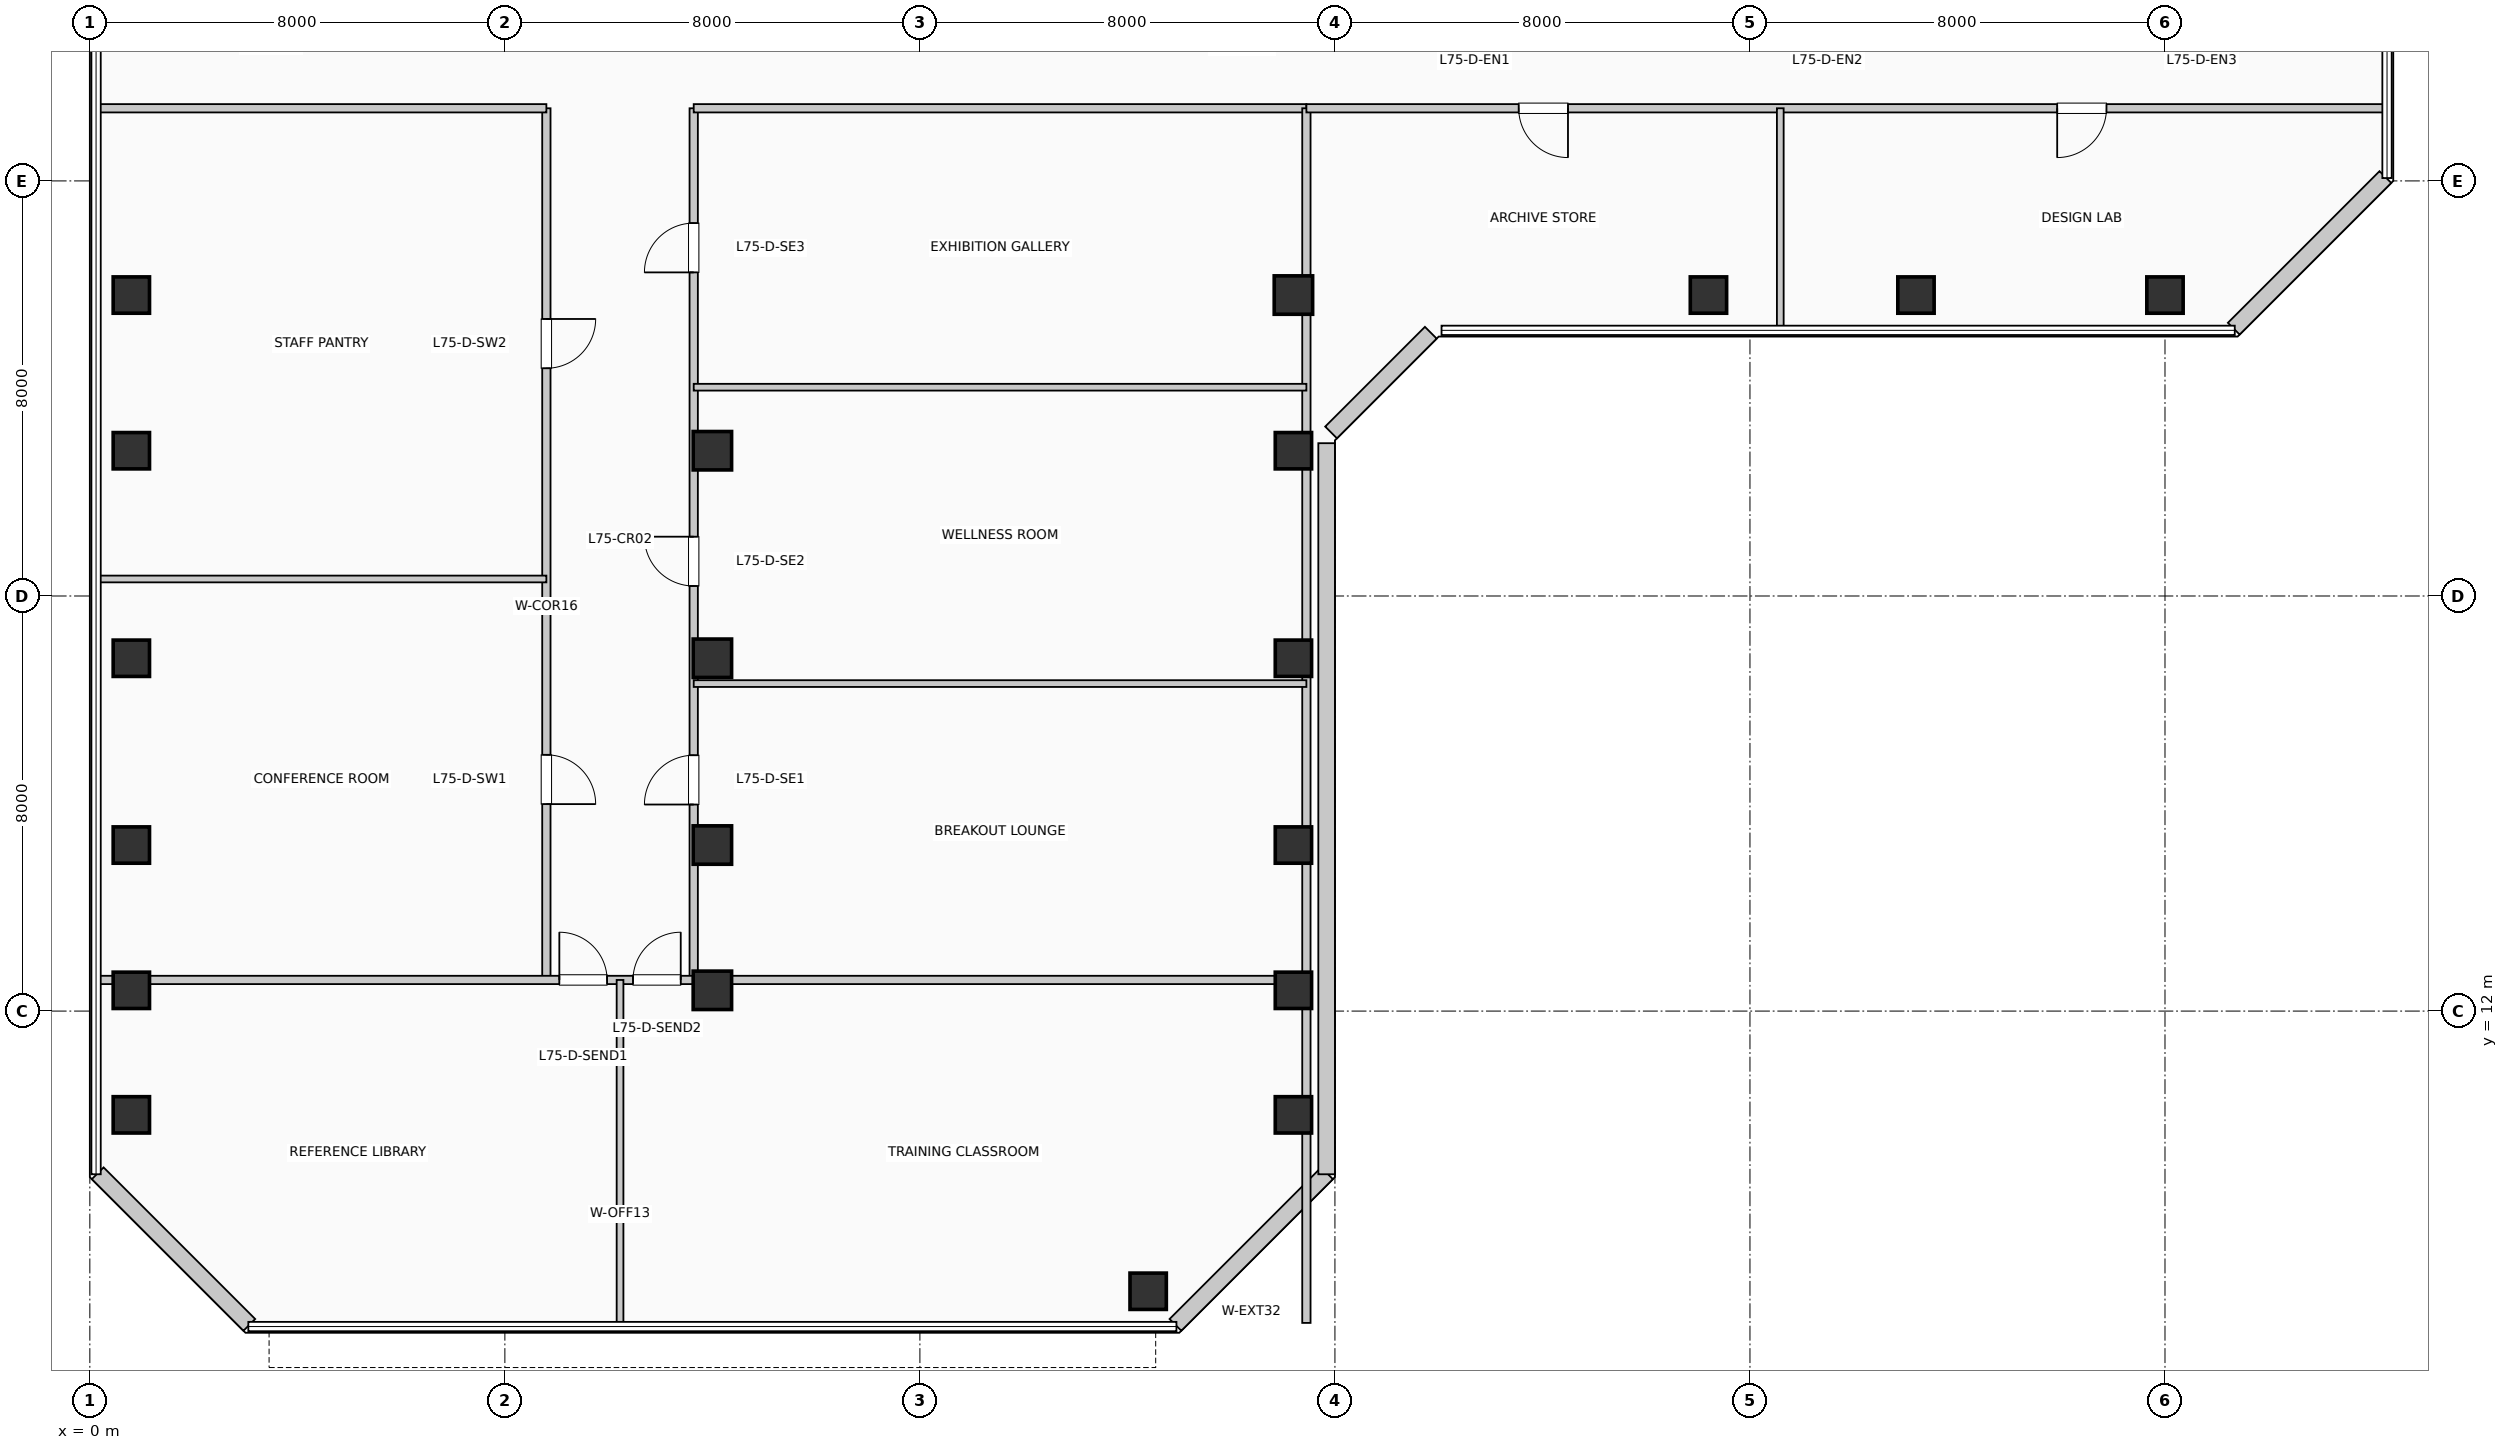
"""IFC4 building model, lengths in metres.
Left out: names, types, materials, properties, quantities, classifications, styles, units other than length and angle.
Written with IfcOpenShell. Run it as: python <this file> out.ifc"""

import sys

from ifc_helpers import new_model, si_unit, direction, frame, frame_2d, origin, origin_2d, place, context, subcontext, project, spatial, rectangle, extrude, element, fill, save


model = new_model("IFC4")
c1 = context("Model", 3, precision=1e-05, world=origin(), true_north=direction((0.0, 1.0)))
c2 = subcontext(c1, "Body", "Model", "MODEL_VIEW")
j1 = project(units=[si_unit("LENGTHUNIT", "METRE"), si_unit("PLANEANGLEUNIT", "RADIAN")], contexts=[c1])
p1 = place(None, origin())
s1 = spatial("IfcSite", under=j1, at=p1, CompositionType="ELEMENT")
p2 = place(p1, origin())
s2 = spatial("IfcBuilding", under=s1, at=p2, CompositionType="ELEMENT")
p3 = place(p2, frame((0.0, 0.0, 307.89)))
s3 = spatial("IfcBuildingStorey", under=s2, at=p3, CompositionType="ELEMENT", Elevation=307.89)
for number, where, z_axis, x_axis in (
    (1, (0.8, 10.0, 0.0), (0.0, 0.0, 1.0), (1.0, 0.0, 0.0)),
    (2, (0.8, 12.4, 0.0), (0.0, 0.0, 1.0), (1.0, 0.0, 0.0)),
    (3, (0.8, 15.2, 0.0), (0.0, 0.0, 1.0), (1.0, 0.0, 0.0)),
    (4, (0.8, 18.8, 0.0), (0.0, 0.0, 1.0), (1.0, 0.0, 0.0)),
    (5, (0.8, 22.8, 0.0), (0.0, 0.0, 1.0), (1.0, 0.0, 0.0)),
    (6, (0.8, 25.8, 0.0), (0.0, 0.0, 1.0), (1.0, 0.0, 0.0)),
):
    element("IfcColumn", number, at=place(p3, frame(where, z_axis=z_axis, x_axis=x_axis)), inside=s3, PredefinedType="COLUMN", context=c2, shape_type="SweptSolid", body=[
        extrude(rectangle(XDim=0.7, YDim=0.7, at=origin_2d()), origin(), (0.0, 0.0, 1.0), 3.96),
    ])
for number, where, z_axis, x_axis in (
    (7, (12.0, 12.4, 0.0), (0.0, 0.0, 1.0), (1.0, 0.0, 0.0)),
    (8, (12.0, 15.2, 0.0), (0.0, 0.0, 1.0), (1.0, 0.0, 0.0)),
    (9, (12.0, 18.8, 0.0), (0.0, 0.0, 1.0), (1.0, 0.0, 0.0)),
    (10, (12.0, 22.8, 0.0), (0.0, 0.0, 1.0), (1.0, 0.0, 0.0)),
):
    element("IfcColumn", number, at=place(p3, frame(where, z_axis=z_axis, x_axis=x_axis)), inside=s3, PredefinedType="COLUMN", context=c2, shape_type="SweptSolid", body=[
        extrude(rectangle(XDim=0.74, YDim=0.74, at=origin_2d()), origin(), (0.0, 0.0, 1.0), 3.96),
    ])
for number, where, z_axis, x_axis in (
    (11, (20.4, 6.6, 0.0), (0.0, 0.0, 1.0), (1.0, 0.0, 0.0)),
    (12, (23.2, 10.0, 0.0), (0.0, 0.0, 1.0), (1.0, 0.0, 0.0)),
    (13, (23.2, 12.4, 0.0), (0.0, 0.0, 1.0), (1.0, 0.0, 0.0)),
    (14, (23.2, 15.2, 0.0), (0.0, 0.0, 1.0), (1.0, 0.0, 0.0)),
    (15, (23.2, 18.8, 0.0), (0.0, 0.0, 1.0), (1.0, 0.0, 0.0)),
    (16, (23.2, 22.8, 0.0), (0.0, 0.0, 1.0), (1.0, 0.0, 0.0)),
):
    element("IfcColumn", number, at=place(p3, frame(where, z_axis=z_axis, x_axis=x_axis)), inside=s3, PredefinedType="COLUMN", context=c2, shape_type="SweptSolid", body=[
        extrude(rectangle(XDim=0.7, YDim=0.7, at=origin_2d()), origin(), (0.0, 0.0, 1.0), 3.96),
    ])
p4 = place(p3, frame((23.2, 25.8, 0.0), z_axis=(0.0, 0.0, 1.0), x_axis=(1.0, 0.0, 0.0)))
e17 = element("IfcColumn", 17, at=p4, inside=s3, PredefinedType="COLUMN", context=c2, shape_type="SweptSolid", body=[
    extrude(rectangle(XDim=0.74, YDim=0.74, at=origin_2d()), origin(), (0.0, 0.0, 1.0), 3.96),
])
for number, where, z_axis, x_axis in (
    (18, (31.2, 25.8, 0.0), (0.0, 0.0, 1.0), (1.0, 0.0, 0.0)),
    (19, (35.2, 25.8, 0.0), (0.0, 0.0, 1.0), (1.0, 0.0, 0.0)),
    (20, (40.0, 25.8, 0.0), (0.0, 0.0, 1.0), (1.0, 0.0, 0.0)),
):
    element("IfcColumn", number, at=place(p3, frame(where, z_axis=z_axis, x_axis=x_axis)), inside=s3, PredefinedType="COLUMN", context=c2, shape_type="SweptSolid", body=[
        extrude(rectangle(XDim=0.7, YDim=0.7, at=origin_2d()), origin(), (0.0, 0.0, 1.0), 3.96),
    ])
p5 = place(p3, frame((20.926, 5.952, 0.0), z_axis=(0.0, 0.0, 1.0), x_axis=(0.707077242712, 0.707136318428, 0.0)))
e21 = element("IfcWall", 21, at=p5, inside=s3, PredefinedType="SOLIDWALL", context=c2, shape_type="SweptSolid", body=[
    extrude(rectangle(XDim=4.133, YDim=0.32, at=frame_2d((2.066, 0.0))), origin(), (0.0, 0.0, 1.0), 3.74),
])
p6 = place(p3, frame((23.84, 8.855, 0.0), z_axis=(0.0, 0.0, 1.0), x_axis=(0.0, 1.0, 0.0)))
e22 = element("IfcWall", 22, at=p6, inside=s3, PredefinedType="SOLIDWALL", context=c2, shape_type="SweptSolid", body=[
    extrude(rectangle(XDim=14.09, YDim=0.32, at=frame_2d((7.045, 0.0))), origin(), (0.0, 0.0, 1.0), 3.74),
])
p7 = place(p3, frame((23.926, 23.152, 0.0), z_axis=(0.0, 0.0, 1.0), x_axis=(0.707106781187, 0.707106781187, 0.0)))
e23 = element("IfcWall", 23, at=p7, inside=s3, PredefinedType="SOLIDWALL", context=c2, shape_type="SweptSolid", body=[
    extrude(rectangle(XDim=2.718, YDim=0.32, at=frame_2d((1.359, 0.0))), origin(), (0.0, 0.0, 1.0), 3.74),
])
for number, where, z_axis, x_axis in (
    (24, (41.326, 25.152, 0.0), (0.0, 0.0, 1.0), (0.707, 0.707, 0.0)),
    (25, (0.152, 8.874, 0.0), (0.0, 0.0, 1.0), (0.707, -0.707, 0.0)),
):
    element("IfcWall", number, at=place(p3, frame(where, z_axis=z_axis, x_axis=x_axis)), inside=s3, PredefinedType="SOLIDWALL", context=c2, shape_type="SweptSolid", body=[
        extrude(rectangle(XDim=4.133, YDim=0.32, at=frame_2d((2.066, 0.0))), origin(), (0.0, 0.0, 1.0), 3.74),
    ])
p8 = place(p3, frame((8.8, 12.6, 0.0), z_axis=(0.0, 0.0, 1.0), x_axis=(0.0, 1.0, 0.0)))
e26 = element("IfcWall", 26, at=p8, inside=s3, PredefinedType="PARTITIONING", context=c2, shape_type="SweptSolid", body=[
    extrude(rectangle(XDim=16.8, YDim=0.16, at=frame_2d((8.4, 0.0))), origin(), (0.0, 0.0, 1.0), 3.74),
])
p9 = place(p8, frame((4.339, 0.0, 0.0), z_axis=(0.0, 0.0, 1.0), x_axis=(-1.0, 0.0, 0.0)))
e27 = element("IfcOpeningElement", 27, at=p9, cuts=e26, PredefinedType="OPENING", context=c2, shape_type="SweptSolid", body=[
    extrude(rectangle(XDim=0.95, YDim=2.15, at=frame_2d((0.475, 1.075))), frame((0.0, 0.09, 0.0), z_axis=(0.0, -1.0, 0.0), x_axis=(1.0, 0.0, 0.0)), (0.0, 0.0, 1.0), 0.18),
])
p10 = place(p8, frame((12.739, 0.0, 0.0), z_axis=(0.0, 0.0, 1.0), x_axis=(-1.0, 0.0, 0.0)))
e28 = element("IfcOpeningElement", 28, at=p10, cuts=e26, PredefinedType="OPENING", context=c2, shape_type="SweptSolid", body=[
    extrude(rectangle(XDim=0.95, YDim=2.15, at=frame_2d((0.475, 1.075))), frame((0.0, 0.09, 0.0), z_axis=(0.0, -1.0, 0.0), x_axis=(1.0, 0.0, 0.0)), (0.0, 0.0, 1.0), 0.18),
])
p11 = place(p3, frame((11.64, 12.6, 0.0), z_axis=(0.0, 0.0, 1.0), x_axis=(0.0, 1.0, 0.0)))
e29 = element("IfcWall", 29, at=p11, inside=s3, PredefinedType="PARTITIONING", context=c2, shape_type="SweptSolid", body=[
    extrude(rectangle(XDim=16.8, YDim=0.16, at=frame_2d((8.4, 0.0))), origin(), (0.0, 0.0, 1.0), 3.175),
])
p12 = place(p11, frame((3.381, 0.0, 0.0)))
e30 = element("IfcOpeningElement", 30, at=p12, cuts=e29, PredefinedType="OPENING", context=c2, shape_type="SweptSolid", body=[
    extrude(rectangle(XDim=0.95, YDim=2.15, at=frame_2d((0.475, 1.075))), frame((0.0, 0.09, 0.0), z_axis=(0.0, -1.0, 0.0), x_axis=(1.0, 0.0, 0.0)), (0.0, 0.0, 1.0), 0.18),
])
p13 = place(p11, frame((7.593, 0.0, 0.0)))
e31 = element("IfcOpeningElement", 31, at=p13, cuts=e29, PredefinedType="OPENING", context=c2, shape_type="SweptSolid", body=[
    extrude(rectangle(XDim=0.95, YDim=2.15, at=frame_2d((0.475, 1.075))), frame((0.0, 0.09, 0.0), z_axis=(0.0, -1.0, 0.0), x_axis=(1.0, 0.0, 0.0)), (0.0, 0.0, 1.0), 0.18),
])
p14 = place(p11, frame((13.637, 0.0, 0.0)))
e32 = element("IfcOpeningElement", 32, at=p14, cuts=e29, PredefinedType="OPENING", context=c2, shape_type="SweptSolid", body=[
    extrude(rectangle(XDim=0.95, YDim=2.15, at=frame_2d((0.475, 1.075))), frame((0.0, 0.09, 0.0), z_axis=(0.0, -1.0, 0.0), x_axis=(1.0, 0.0, 0.0)), (0.0, 0.0, 1.0), 0.18),
])
p15 = place(p3, frame((0.19, 12.6, 0.0), z_axis=(0.0, 0.0, 1.0), x_axis=(1.0, 0.0, 0.0)))
e33 = element("IfcWall", 33, at=p15, inside=s3, PredefinedType="PARTITIONING", context=c2, shape_type="SweptSolid", body=[
    extrude(rectangle(XDim=23.26, YDim=0.16, at=frame_2d((11.63, 0.0))), origin(), (0.0, 0.0, 1.0), 3.175),
])
p16 = place(p15, frame((8.86, 0.0, 0.0)))
e34 = element("IfcOpeningElement", 34, at=p16, cuts=e33, PredefinedType="OPENING", context=c2, shape_type="SweptSolid", body=[
    extrude(rectangle(XDim=0.92, YDim=2.1, at=frame_2d((0.46, 1.05))), frame((0.0, 0.09, 0.0), z_axis=(0.0, -1.0, 0.0), x_axis=(1.0, 0.0, 0.0)), (0.0, 0.0, 1.0), 0.18),
])
p17 = place(p15, frame((10.28, 0.0, 0.0)))
e35 = element("IfcOpeningElement", 35, at=p17, cuts=e33, PredefinedType="OPENING", context=c2, shape_type="SweptSolid", body=[
    extrude(rectangle(XDim=0.92, YDim=2.1, at=frame_2d((0.46, 1.05))), frame((0.0, 0.09, 0.0), z_axis=(0.0, -1.0, 0.0), x_axis=(1.0, 0.0, 0.0)), (0.0, 0.0, 1.0), 0.18),
])
p18 = place(p3, frame((0.19, 29.4, 0.0), z_axis=(0.0, 0.0, 1.0), x_axis=(1.0, 0.0, 0.0)))
e36 = element("IfcWall", 36, at=p18, inside=s3, PredefinedType="PARTITIONING", context=c2, shape_type="SweptSolid", body=[
    extrude(rectangle(XDim=8.61, YDim=0.16, at=frame_2d((4.305, 0.0))), origin(), (0.0, 0.0, 1.0), 3.425),
])
p19 = place(p3, frame((11.64, 29.4, 0.0), z_axis=(0.0, 0.0, 1.0), x_axis=(1.0, 0.0, 0.0)))
e37 = element("IfcWall", 37, at=p19, inside=s3, PredefinedType="PARTITIONING", context=c2, shape_type="SweptSolid", body=[
    extrude(rectangle(XDim=11.81, YDim=0.16, at=frame_2d((5.905, 0.0))), origin(), (0.0, 0.0, 1.0), 3.425),
])
p20 = place(p3, frame((23.45, 5.99, 0.0), z_axis=(0.0, 0.0, 1.0), x_axis=(0.0, 1.0, 0.0)))
e38 = element("IfcWall", 38, at=p20, inside=s3, PredefinedType="PARTITIONING", context=c2, shape_type="SweptSolid", body=[
    extrude(rectangle(XDim=23.41, YDim=0.16, at=frame_2d((11.705, 0.0))), origin(), (0.0, 0.0, 1.0), 3.175),
])
p21 = place(p3, frame((10.22, 5.99, 0.0), z_axis=(0.0, 0.0, 1.0), x_axis=(0.0, 1.0, 0.0)))
e39 = element("IfcWall", 39, at=p21, inside=s3, PredefinedType="PARTITIONING", context=c2, shape_type="SweptSolid", body=[
    extrude(rectangle(XDim=6.61, YDim=0.13, at=frame_2d((3.305, 0.0))), origin(), (0.0, 0.0, 1.0), 3.74),
])
p22 = place(p3, frame((0.19, 20.328, 0.0), z_axis=(0.0, 0.0, 1.0), x_axis=(1.0, 0.0, 0.0)))
e40 = element("IfcWall", 40, at=p22, inside=s3, PredefinedType="PARTITIONING", context=c2, shape_type="SweptSolid", body=[
    extrude(rectangle(XDim=8.61, YDim=0.13, at=frame_2d((4.305, 0.0))), origin(), (0.0, 0.0, 1.0), 3.74),
])
for number, where, z_axis, x_axis in (
    (41, (11.64, 18.312, 0.0), (0.0, 0.0, 1.0), (1.0, 0.0, 0.0)),
    (42, (11.64, 24.024, 0.0), (0.0, 0.0, 1.0), (1.0, 0.0, 0.0)),
):
    element("IfcWall", number, at=place(p3, frame(where, z_axis=z_axis, x_axis=x_axis)), inside=s3, PredefinedType="PARTITIONING", context=c2, shape_type="SweptSolid", body=[
        extrude(rectangle(XDim=11.81, YDim=0.13, at=frame_2d((5.905, 0.0))), origin(), (0.0, 0.0, 1.0), 3.74),
    ])
p23 = place(p3, frame((23.45, 29.4, 0.0), z_axis=(0.0, 0.0, 1.0), x_axis=(1.0, 0.0, 0.0)))
e43 = element("IfcWall", 43, at=p23, inside=s3, PredefinedType="PARTITIONING", context=c2, shape_type="SweptSolid", body=[
    extrude(rectangle(XDim=20.76, YDim=0.16, at=frame_2d((10.38, 0.0))), origin(), (0.0, 0.0, 1.0), 3.425),
])
p24 = place(p23, frame((5.042, 0.0, 0.0), z_axis=(0.0, 0.0, 1.0), x_axis=(-1.0, 0.0, 0.0)))
e44 = element("IfcOpeningElement", 44, at=p24, cuts=e43, PredefinedType="OPENING", context=c2, shape_type="SweptSolid", body=[
    extrude(rectangle(XDim=0.95, YDim=2.15, at=frame_2d((0.475, 1.075))), frame((0.0, 0.09, 0.0), z_axis=(0.0, -1.0, 0.0), x_axis=(1.0, 0.0, 0.0)), (0.0, 0.0, 1.0), 0.18),
])
p25 = place(p23, frame((15.422, 0.0, 0.0), z_axis=(0.0, 0.0, 1.0), x_axis=(-1.0, 0.0, 0.0)))
e45 = element("IfcOpeningElement", 45, at=p25, cuts=e43, PredefinedType="OPENING", context=c2, shape_type="SweptSolid", body=[
    extrude(rectangle(XDim=0.95, YDim=2.15, at=frame_2d((0.475, 1.075))), frame((0.0, 0.09, 0.0), z_axis=(0.0, -1.0, 0.0), x_axis=(1.0, 0.0, 0.0)), (0.0, 0.0, 1.0), 0.18),
])
p26 = place(p3, frame((32.584, 25.19, 0.0), z_axis=(0.0, 0.0, 1.0), x_axis=(0.0, 1.0, 0.0)))
e46 = element("IfcWall", 46, at=p26, inside=s3, PredefinedType="PARTITIONING", context=c2, shape_type="SweptSolid", body=[
    extrude(rectangle(XDim=4.21, YDim=0.13, at=frame_2d((2.105, 0.0))), origin(), (0.0, 0.0, 1.0), 3.74),
])
p27 = place(p16, origin())
e47 = element("IfcDoor", 47, at=p27, inside=s3, OperationType="SINGLE_SWING_LEFT", PredefinedType="DOOR", context=c2, shape_type="SweptSolid", body=[
    extrude(rectangle(XDim=0.92, YDim=2.1, at=frame_2d((0.46, 1.05))), frame((0.0, 0.025, 0.0), z_axis=(0.0, -1.0, 0.0), x_axis=(1.0, 0.0, 0.0)), (0.0, 0.0, 1.0), 0.05),
])
fill(e34, e47)
p28 = place(p17, origin())
e48 = element("IfcDoor", 48, at=p28, inside=s3, OperationType="SINGLE_SWING_RIGHT", PredefinedType="DOOR", context=c2, shape_type="SweptSolid", body=[
    extrude(rectangle(XDim=0.92, YDim=2.1, at=frame_2d((0.46, 1.05))), frame((0.0, 0.025, 0.0), z_axis=(0.0, -1.0, 0.0), x_axis=(1.0, 0.0, 0.0)), (0.0, 0.0, 1.0), 0.05),
])
fill(e35, e48)
p29 = place(p9, origin())
e49 = element("IfcDoor", 49, at=p29, inside=s3, OperationType="SINGLE_SWING_LEFT", PredefinedType="DOOR", context=c2, shape_type="SweptSolid", body=[
    extrude(rectangle(XDim=0.95, YDim=2.15, at=frame_2d((0.475, 1.075))), frame((0.0, 0.025, 0.0), z_axis=(0.0, -1.0, 0.0), x_axis=(1.0, 0.0, 0.0)), (0.0, 0.0, 1.0), 0.05),
])
fill(e27, e49)
p30 = place(p10, origin())
e50 = element("IfcDoor", 50, at=p30, inside=s3, OperationType="SINGLE_SWING_RIGHT", PredefinedType="DOOR", context=c2, shape_type="SweptSolid", body=[
    extrude(rectangle(XDim=0.95, YDim=2.15, at=frame_2d((0.475, 1.075))), frame((0.0, 0.025, 0.0), z_axis=(0.0, -1.0, 0.0), x_axis=(1.0, 0.0, 0.0)), (0.0, 0.0, 1.0), 0.05),
])
fill(e28, e50)
p31 = place(p12, origin())
e51 = element("IfcDoor", 51, at=p31, inside=s3, OperationType="SINGLE_SWING_LEFT", PredefinedType="DOOR", context=c2, shape_type="SweptSolid", body=[
    extrude(rectangle(XDim=0.95, YDim=2.15, at=frame_2d((0.475, 1.075))), frame((0.0, 0.025, 0.0), z_axis=(0.0, -1.0, 0.0), x_axis=(1.0, 0.0, 0.0)), (0.0, 0.0, 1.0), 0.05),
])
fill(e30, e51)
p32 = place(p13, origin())
e52 = element("IfcDoor", 52, at=p32, inside=s3, OperationType="SINGLE_SWING_RIGHT", PredefinedType="DOOR", context=c2, shape_type="SweptSolid", body=[
    extrude(rectangle(XDim=0.95, YDim=2.15, at=frame_2d((0.475, 1.075))), frame((0.0, 0.025, 0.0), z_axis=(0.0, -1.0, 0.0), x_axis=(1.0, 0.0, 0.0)), (0.0, 0.0, 1.0), 0.05),
])
fill(e31, e52)
p33 = place(p14, origin())
e53 = element("IfcDoor", 53, at=p33, inside=s3, OperationType="SINGLE_SWING_LEFT", PredefinedType="DOOR", context=c2, shape_type="SweptSolid", body=[
    extrude(rectangle(XDim=0.95, YDim=2.15, at=frame_2d((0.475, 1.075))), frame((0.0, 0.025, 0.0), z_axis=(0.0, -1.0, 0.0), x_axis=(1.0, 0.0, 0.0)), (0.0, 0.0, 1.0), 0.05),
])
fill(e32, e53)
p34 = place(p24, origin())
e54 = element("IfcDoor", 54, at=p34, inside=s3, OperationType="SINGLE_SWING_RIGHT", PredefinedType="DOOR", context=c2, shape_type="SweptSolid", body=[
    extrude(rectangle(XDim=0.95, YDim=2.15, at=frame_2d((0.475, 1.075))), frame((0.0, 0.025, 0.0), z_axis=(0.0, -1.0, 0.0), x_axis=(1.0, 0.0, 0.0)), (0.0, 0.0, 1.0), 0.05),
])
fill(e44, e54)
p35 = place(p25, origin())
e55 = element("IfcDoor", 55, at=p35, inside=s3, OperationType="SINGLE_SWING_LEFT", PredefinedType="DOOR", context=c2, shape_type="SweptSolid", body=[
    extrude(rectangle(XDim=0.95, YDim=2.15, at=frame_2d((0.475, 1.075))), frame((0.0, 0.025, 0.0), z_axis=(0.0, -1.0, 0.0), x_axis=(1.0, 0.0, 0.0)), (0.0, 0.0, 1.0), 0.05),
])
fill(e45, e55)
save(model, sys.argv[1])
